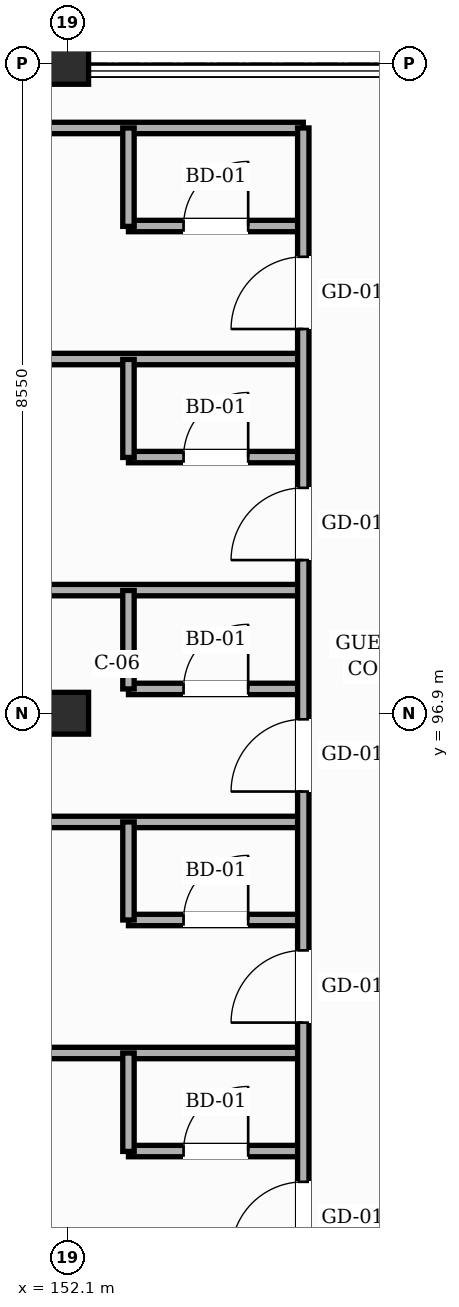
"""IFC4 building model, lengths in metres.
Left out: names, types, materials, properties, quantities, classifications, styles, units other than length and angle.
Written with IfcOpenShell. Run it as: python <this file> out.ifc"""

import sys

from ifc_helpers import new_model, si_unit, direction, frame, frame_2d, origin, origin_2d, place, context, subcontext, project, spatial, rectangle, hollow_rectangle, extrude, element, fill, save


model = new_model("IFC4")
c1 = context("Model", 3, precision=1e-05, world=origin(), true_north=direction((0.0, 1.0)))
c2 = subcontext(c1, "Body", "Model", "MODEL_VIEW")
j1 = project(units=[si_unit("LENGTHUNIT", "METRE"), si_unit("PLANEANGLEUNIT", "RADIAN")], contexts=[c1])
p1 = place(None, origin())
s1 = spatial("IfcSite", under=j1, at=p1, CompositionType="ELEMENT")
p2 = place(p1, origin())
s2 = spatial("IfcBuilding", under=s1, at=p2, CompositionType="ELEMENT")
p3 = place(p2, frame((0.0, 0.0, 24.6)))
s3 = spatial("IfcBuildingStorey", under=s2, at=p3, CompositionType="ELEMENT", Elevation=24.6)
for number, where, z_axis, x_axis in (
    (1, (152.1, 96.9, 0.0), (0.0, 0.0, 1.0), (1.0, 0.0, 0.0)),
    (2, (152.1, 105.45, 0.0), (0.0, 0.0, 1.0), (1.0, 0.0, 0.0)),
):
    element("IfcColumn", number, at=place(p3, frame(where, z_axis=z_axis, x_axis=x_axis)), inside=s3, PredefinedType="COLUMN", context=c2, shape_type="SweptSolid", body=[
        extrude(hollow_rectangle(XDim=0.55, YDim=0.55, WallThickness=0.022, InnerFilletRadius=0.022, OuterFilletRadius=0.044, at=origin_2d()), origin(), (0.0, 0.0, 1.0), 3.6),
    ])
p4 = place(p3, frame((152.9, 91.14, 0.0), z_axis=(0.0, 0.0, 1.0), x_axis=(1.0, 0.0, 0.0)))
e3 = element("IfcWall", 3, at=p4, inside=s3, PredefinedType="PARTITIONING", context=c2, shape_type="SweptSolid", body=[
    extrude(rectangle(XDim=2.3, YDim=0.15, at=frame_2d((1.15, 0.0))), origin(), (0.0, 0.0, 1.0), 3.365),
])
p5 = place(p4, frame((0.725, 0.0, 0.0)))
e4 = element("IfcOpeningElement", 4, at=p5, cuts=e3, PredefinedType="OPENING", context=c2, shape_type="SweptSolid", body=[
    extrude(rectangle(XDim=0.85, YDim=2.1, at=frame_2d((0.425, 1.05))), frame((0.0, 0.085, 0.0), z_axis=(0.0, -1.0, 0.0), x_axis=(1.0, 0.0, 0.0)), (0.0, 0.0, 1.0), 0.17),
])
p6 = place(p3, frame((144.2, 92.43, 0.0), z_axis=(0.0, 0.0, 1.0), x_axis=(1.0, 0.0, 0.0)))
e5 = element("IfcWall", 5, at=p6, inside=s3, PredefinedType="PARTITIONING", context=c2, shape_type="SweptSolid", body=[
    extrude(rectangle(XDim=11.0, YDim=0.15, at=frame_2d((5.5, 0.0))), origin(), (0.0, 0.0, 1.0), 3.365),
])
p7 = place(p3, frame((152.9, 94.18, 0.0), z_axis=(0.0, 0.0, 1.0), x_axis=(1.0, 0.0, 0.0)))
e6 = element("IfcWall", 6, at=p7, inside=s3, PredefinedType="PARTITIONING", context=c2, shape_type="SweptSolid", body=[
    extrude(rectangle(XDim=2.3, YDim=0.15, at=frame_2d((1.15, 0.0))), origin(), (0.0, 0.0, 1.0), 3.365),
])
p8 = place(p7, frame((0.725, 0.0, 0.0)))
e7 = element("IfcOpeningElement", 7, at=p8, cuts=e6, PredefinedType="OPENING", context=c2, shape_type="SweptSolid", body=[
    extrude(rectangle(XDim=0.85, YDim=2.1, at=frame_2d((0.425, 1.05))), frame((0.0, 0.085, 0.0), z_axis=(0.0, -1.0, 0.0), x_axis=(1.0, 0.0, 0.0)), (0.0, 0.0, 1.0), 0.17),
])
p9 = place(p3, frame((144.2, 95.47, 0.0), z_axis=(0.0, 0.0, 1.0), x_axis=(1.0, 0.0, 0.0)))
e8 = element("IfcWall", 8, at=p9, inside=s3, PredefinedType="PARTITIONING", context=c2, shape_type="SweptSolid", body=[
    extrude(rectangle(XDim=11.0, YDim=0.15, at=frame_2d((5.5, 0.0))), origin(), (0.0, 0.0, 1.0), 3.365),
])
p10 = place(p3, frame((152.9, 97.22, 0.0), z_axis=(0.0, 0.0, 1.0), x_axis=(1.0, 0.0, 0.0)))
e9 = element("IfcWall", 9, at=p10, inside=s3, PredefinedType="PARTITIONING", context=c2, shape_type="SweptSolid", body=[
    extrude(rectangle(XDim=2.3, YDim=0.15, at=frame_2d((1.15, 0.0))), origin(), (0.0, 0.0, 1.0), 2.805),
])
p11 = place(p10, frame((0.725, 0.0, 0.0)))
e10 = element("IfcOpeningElement", 10, at=p11, cuts=e9, PredefinedType="OPENING", context=c2, shape_type="SweptSolid", body=[
    extrude(rectangle(XDim=0.85, YDim=2.1, at=frame_2d((0.425, 1.05))), frame((0.0, 0.085, 0.0), z_axis=(0.0, -1.0, 0.0), x_axis=(1.0, 0.0, 0.0)), (0.0, 0.0, 1.0), 0.17),
])
p12 = place(p3, frame((144.2, 98.52, 0.0), z_axis=(0.0, 0.0, 1.0), x_axis=(1.0, 0.0, 0.0)))
e11 = element("IfcWall", 11, at=p12, inside=s3, PredefinedType="PARTITIONING", context=c2, shape_type="SweptSolid", body=[
    extrude(rectangle(XDim=11.0, YDim=0.15, at=frame_2d((5.5, 0.0))), origin(), (0.0, 0.0, 1.0), 3.365),
])
p13 = place(p3, frame((152.9, 100.27, 0.0), z_axis=(0.0, 0.0, 1.0), x_axis=(1.0, 0.0, 0.0)))
e12 = element("IfcWall", 12, at=p13, inside=s3, PredefinedType="PARTITIONING", context=c2, shape_type="SweptSolid", body=[
    extrude(rectangle(XDim=2.3, YDim=0.15, at=frame_2d((1.15, 0.0))), origin(), (0.0, 0.0, 1.0), 3.365),
])
p14 = place(p13, frame((0.725, 0.0, 0.0)))
e13 = element("IfcOpeningElement", 13, at=p14, cuts=e12, PredefinedType="OPENING", context=c2, shape_type="SweptSolid", body=[
    extrude(rectangle(XDim=0.85, YDim=2.1, at=frame_2d((0.425, 1.05))), frame((0.0, 0.085, 0.0), z_axis=(0.0, -1.0, 0.0), x_axis=(1.0, 0.0, 0.0)), (0.0, 0.0, 1.0), 0.17),
])
p15 = place(p3, frame((144.2, 101.56, 0.0), z_axis=(0.0, 0.0, 1.0), x_axis=(1.0, 0.0, 0.0)))
e14 = element("IfcWall", 14, at=p15, inside=s3, PredefinedType="PARTITIONING", context=c2, shape_type="SweptSolid", body=[
    extrude(rectangle(XDim=11.0, YDim=0.15, at=frame_2d((5.5, 0.0))), origin(), (0.0, 0.0, 1.0), 3.365),
])
p16 = place(p3, frame((152.9, 103.31, 0.0), z_axis=(0.0, 0.0, 1.0), x_axis=(1.0, 0.0, 0.0)))
e15 = element("IfcWall", 15, at=p16, inside=s3, PredefinedType="PARTITIONING", context=c2, shape_type="SweptSolid", body=[
    extrude(rectangle(XDim=2.3, YDim=0.15, at=frame_2d((1.15, 0.0))), origin(), (0.0, 0.0, 1.0), 3.365),
])
p17 = place(p16, frame((0.725, 0.0, 0.0)))
e16 = element("IfcOpeningElement", 16, at=p17, cuts=e15, PredefinedType="OPENING", context=c2, shape_type="SweptSolid", body=[
    extrude(rectangle(XDim=0.85, YDim=2.1, at=frame_2d((0.425, 1.05))), frame((0.0, 0.085, 0.0), z_axis=(0.0, -1.0, 0.0), x_axis=(1.0, 0.0, 0.0)), (0.0, 0.0, 1.0), 0.17),
])
p18 = place(p3, frame((144.2, 104.6, 0.0), z_axis=(0.0, 0.0, 1.0), x_axis=(1.0, 0.0, 0.0)))
e17 = element("IfcWall", 17, at=p18, inside=s3, PredefinedType="PARTITIONING", context=c2, shape_type="SweptSolid", body=[
    extrude(rectangle(XDim=11.0, YDim=0.15, at=frame_2d((5.5, 0.0))), origin(), (0.0, 0.0, 1.0), 3.365),
])
p19 = place(p3, frame((152.9, 91.135, 0.0), z_axis=(0.0, 0.0, 1.0), x_axis=(0.0, 1.0, 0.0)))
e18 = element("IfcWall", 18, at=p19, inside=s3, PredefinedType="PARTITIONING", context=c2, shape_type="SweptSolid", body=[
    extrude(rectangle(XDim=1.295, YDim=0.15, at=frame_2d((0.647, 0.0))), origin(), (0.0, 0.0, 1.0), 3.365),
])
p20 = place(p3, frame((152.9, 94.18, 0.0), z_axis=(0.0, 0.0, 1.0), x_axis=(0.0, 1.0, 0.0)))
e19 = element("IfcWall", 19, at=p20, inside=s3, PredefinedType="PARTITIONING", context=c2, shape_type="SweptSolid", body=[
    extrude(rectangle(XDim=1.29, YDim=0.15, at=frame_2d((0.645, 0.0))), origin(), (0.0, 0.0, 1.0), 3.365),
])
p21 = place(p3, frame((152.9, 97.22, 0.0), z_axis=(0.0, 0.0, 1.0), x_axis=(0.0, 1.0, 0.0)))
e20 = element("IfcWall", 20, at=p21, inside=s3, PredefinedType="PARTITIONING", context=c2, shape_type="SweptSolid", body=[
    extrude(rectangle(XDim=1.295, YDim=0.15, at=frame_2d((0.647, 0.0))), origin(), (0.0, 0.0, 1.0), 3.365),
])
p22 = place(p3, frame((152.9, 100.265, 0.0), z_axis=(0.0, 0.0, 1.0), x_axis=(0.0, 1.0, 0.0)))
e21 = element("IfcWall", 21, at=p22, inside=s3, PredefinedType="PARTITIONING", context=c2, shape_type="SweptSolid", body=[
    extrude(rectangle(XDim=1.29, YDim=0.15, at=frame_2d((0.645, 0.0))), origin(), (0.0, 0.0, 1.0), 3.365),
])
p23 = place(p3, frame((152.9, 103.305, 0.0), z_axis=(0.0, 0.0, 1.0), x_axis=(0.0, 1.0, 0.0)))
e22 = element("IfcWall", 22, at=p23, inside=s3, PredefinedType="PARTITIONING", context=c2, shape_type="SweptSolid", body=[
    extrude(rectangle(XDim=1.295, YDim=0.15, at=frame_2d((0.647, 0.0))), origin(), (0.0, 0.0, 1.0), 3.365),
])
p24 = place(p3, frame((155.2, 62.0, 0.0), z_axis=(0.0, 0.0, 1.0), x_axis=(0.0, 1.0, 0.0)))
e23 = element("IfcWall", 23, at=p24, inside=s3, PredefinedType="PARTITIONING", context=c2, shape_type="SweptSolid", body=[
    extrude(rectangle(XDim=42.6, YDim=0.15, at=frame_2d((21.3, 0.0))), origin(), (0.0, 0.0, 1.0), 3.365),
])
p25 = place(p24, frame((0.4, 0.0, 0.0)))
e24 = element("IfcOpeningElement", 24, at=p25, cuts=e23, PredefinedType="OPENING", context=c2, shape_type="SweptSolid", body=[
    extrude(rectangle(XDim=0.95, YDim=2.15, at=frame_2d((0.475, 1.075))), frame((0.0, 0.085, 0.0), z_axis=(0.0, -1.0, 0.0), x_axis=(1.0, 0.0, 0.0)), (0.0, 0.0, 1.0), 0.17),
])
p26 = place(p24, frame((3.445, 0.0, 0.0)))
e25 = element("IfcOpeningElement", 25, at=p26, cuts=e23, PredefinedType="OPENING", context=c2, shape_type="SweptSolid", body=[
    extrude(rectangle(XDim=0.95, YDim=2.15, at=frame_2d((0.475, 1.075))), frame((0.0, 0.085, 0.0), z_axis=(0.0, -1.0, 0.0), x_axis=(1.0, 0.0, 0.0)), (0.0, 0.0, 1.0), 0.17),
])
p27 = place(p24, frame((6.485, 0.0, 0.0)))
e26 = element("IfcOpeningElement", 26, at=p27, cuts=e23, PredefinedType="OPENING", context=c2, shape_type="SweptSolid", body=[
    extrude(rectangle(XDim=0.95, YDim=2.15, at=frame_2d((0.475, 1.075))), frame((0.0, 0.085, 0.0), z_axis=(0.0, -1.0, 0.0), x_axis=(1.0, 0.0, 0.0)), (0.0, 0.0, 1.0), 0.17),
])
p28 = place(p24, frame((9.53, 0.0, 0.0)))
e27 = element("IfcOpeningElement", 27, at=p28, cuts=e23, PredefinedType="OPENING", context=c2, shape_type="SweptSolid", body=[
    extrude(rectangle(XDim=0.95, YDim=2.15, at=frame_2d((0.475, 1.075))), frame((0.0, 0.085, 0.0), z_axis=(0.0, -1.0, 0.0), x_axis=(1.0, 0.0, 0.0)), (0.0, 0.0, 1.0), 0.17),
])
p29 = place(p24, frame((12.57, 0.0, 0.0)))
e28 = element("IfcOpeningElement", 28, at=p29, cuts=e23, PredefinedType="OPENING", context=c2, shape_type="SweptSolid", body=[
    extrude(rectangle(XDim=0.95, YDim=2.15, at=frame_2d((0.475, 1.075))), frame((0.0, 0.085, 0.0), z_axis=(0.0, -1.0, 0.0), x_axis=(1.0, 0.0, 0.0)), (0.0, 0.0, 1.0), 0.17),
])
p30 = place(p24, frame((15.615, 0.0, 0.0)))
e29 = element("IfcOpeningElement", 29, at=p30, cuts=e23, PredefinedType="OPENING", context=c2, shape_type="SweptSolid", body=[
    extrude(rectangle(XDim=0.95, YDim=2.15, at=frame_2d((0.475, 1.075))), frame((0.0, 0.085, 0.0), z_axis=(0.0, -1.0, 0.0), x_axis=(1.0, 0.0, 0.0)), (0.0, 0.0, 1.0), 0.17),
])
p31 = place(p24, frame((18.655, 0.0, 0.0)))
e30 = element("IfcOpeningElement", 30, at=p31, cuts=e23, PredefinedType="OPENING", context=c2, shape_type="SweptSolid", body=[
    extrude(rectangle(XDim=0.95, YDim=2.15, at=frame_2d((0.475, 1.075))), frame((0.0, 0.085, 0.0), z_axis=(0.0, -1.0, 0.0), x_axis=(1.0, 0.0, 0.0)), (0.0, 0.0, 1.0), 0.17),
])
p32 = place(p24, frame((21.7, 0.0, 0.0)))
e31 = element("IfcOpeningElement", 31, at=p32, cuts=e23, PredefinedType="OPENING", context=c2, shape_type="SweptSolid", body=[
    extrude(rectangle(XDim=0.95, YDim=2.15, at=frame_2d((0.475, 1.075))), frame((0.0, 0.085, 0.0), z_axis=(0.0, -1.0, 0.0), x_axis=(1.0, 0.0, 0.0)), (0.0, 0.0, 1.0), 0.17),
])
p33 = place(p24, frame((24.745, 0.0, 0.0)))
e32 = element("IfcOpeningElement", 32, at=p33, cuts=e23, PredefinedType="OPENING", context=c2, shape_type="SweptSolid", body=[
    extrude(rectangle(XDim=0.95, YDim=2.15, at=frame_2d((0.475, 1.075))), frame((0.0, 0.085, 0.0), z_axis=(0.0, -1.0, 0.0), x_axis=(1.0, 0.0, 0.0)), (0.0, 0.0, 1.0), 0.17),
])
p34 = place(p24, frame((27.785, 0.0, 0.0)))
e33 = element("IfcOpeningElement", 33, at=p34, cuts=e23, PredefinedType="OPENING", context=c2, shape_type="SweptSolid", body=[
    extrude(rectangle(XDim=0.95, YDim=2.15, at=frame_2d((0.475, 1.075))), frame((0.0, 0.085, 0.0), z_axis=(0.0, -1.0, 0.0), x_axis=(1.0, 0.0, 0.0)), (0.0, 0.0, 1.0), 0.17),
])
p35 = place(p24, frame((30.83, 0.0, 0.0)))
e34 = element("IfcOpeningElement", 34, at=p35, cuts=e23, PredefinedType="OPENING", context=c2, shape_type="SweptSolid", body=[
    extrude(rectangle(XDim=0.95, YDim=2.15, at=frame_2d((0.475, 1.075))), frame((0.0, 0.085, 0.0), z_axis=(0.0, -1.0, 0.0), x_axis=(1.0, 0.0, 0.0)), (0.0, 0.0, 1.0), 0.17),
])
p36 = place(p24, frame((33.87, 0.0, 0.0)))
e35 = element("IfcOpeningElement", 35, at=p36, cuts=e23, PredefinedType="OPENING", context=c2, shape_type="SweptSolid", body=[
    extrude(rectangle(XDim=0.95, YDim=2.15, at=frame_2d((0.475, 1.075))), frame((0.0, 0.085, 0.0), z_axis=(0.0, -1.0, 0.0), x_axis=(1.0, 0.0, 0.0)), (0.0, 0.0, 1.0), 0.17),
])
p37 = place(p24, frame((36.915, 0.0, 0.0)))
e36 = element("IfcOpeningElement", 36, at=p37, cuts=e23, PredefinedType="OPENING", context=c2, shape_type="SweptSolid", body=[
    extrude(rectangle(XDim=0.95, YDim=2.15, at=frame_2d((0.475, 1.075))), frame((0.0, 0.085, 0.0), z_axis=(0.0, -1.0, 0.0), x_axis=(1.0, 0.0, 0.0)), (0.0, 0.0, 1.0), 0.17),
])
p38 = place(p24, frame((39.955, 0.0, 0.0)))
e37 = element("IfcOpeningElement", 37, at=p38, cuts=e23, PredefinedType="OPENING", context=c2, shape_type="SweptSolid", body=[
    extrude(rectangle(XDim=0.95, YDim=2.15, at=frame_2d((0.475, 1.075))), frame((0.0, 0.085, 0.0), z_axis=(0.0, -1.0, 0.0), x_axis=(1.0, 0.0, 0.0)), (0.0, 0.0, 1.0), 0.17),
])
p39 = place(p34, origin())
e38 = element("IfcDoor", 38, at=p39, inside=s3, OperationType="SINGLE_SWING_LEFT", PredefinedType="DOOR", context=c2, shape_type="SweptSolid", body=[
    extrude(rectangle(XDim=0.95, YDim=2.15, at=frame_2d((0.475, 1.075))), frame((0.0, 0.025, 0.0), z_axis=(0.0, -1.0, 0.0), x_axis=(1.0, 0.0, 0.0)), (0.0, 0.0, 1.0), 0.05),
])
fill(e33, e38)
p40 = place(p5, origin())
e39 = element("IfcDoor", 39, at=p40, inside=s3, OperationType="SINGLE_SWING_RIGHT", PredefinedType="DOOR", context=c2, shape_type="SweptSolid", body=[
    extrude(rectangle(XDim=0.85, YDim=2.1, at=frame_2d((0.425, 1.05))), frame((0.0, 0.025, 0.0), z_axis=(0.0, -1.0, 0.0), x_axis=(1.0, 0.0, 0.0)), (0.0, 0.0, 1.0), 0.05),
])
fill(e4, e39)
p41 = place(p35, origin())
e40 = element("IfcDoor", 40, at=p41, inside=s3, OperationType="SINGLE_SWING_LEFT", PredefinedType="DOOR", context=c2, shape_type="SweptSolid", body=[
    extrude(rectangle(XDim=0.95, YDim=2.15, at=frame_2d((0.475, 1.075))), frame((0.0, 0.025, 0.0), z_axis=(0.0, -1.0, 0.0), x_axis=(1.0, 0.0, 0.0)), (0.0, 0.0, 1.0), 0.05),
])
fill(e34, e40)
p42 = place(p8, origin())
e41 = element("IfcDoor", 41, at=p42, inside=s3, OperationType="SINGLE_SWING_RIGHT", PredefinedType="DOOR", context=c2, shape_type="SweptSolid", body=[
    extrude(rectangle(XDim=0.85, YDim=2.1, at=frame_2d((0.425, 1.05))), frame((0.0, 0.025, 0.0), z_axis=(0.0, -1.0, 0.0), x_axis=(1.0, 0.0, 0.0)), (0.0, 0.0, 1.0), 0.05),
])
fill(e7, e41)
p43 = place(p36, origin())
e42 = element("IfcDoor", 42, at=p43, inside=s3, OperationType="SINGLE_SWING_LEFT", PredefinedType="DOOR", context=c2, shape_type="SweptSolid", body=[
    extrude(rectangle(XDim=0.95, YDim=2.15, at=frame_2d((0.475, 1.075))), frame((0.0, 0.025, 0.0), z_axis=(0.0, -1.0, 0.0), x_axis=(1.0, 0.0, 0.0)), (0.0, 0.0, 1.0), 0.05),
])
fill(e35, e42)
p44 = place(p11, origin())
e43 = element("IfcDoor", 43, at=p44, inside=s3, OperationType="SINGLE_SWING_RIGHT", PredefinedType="DOOR", context=c2, shape_type="SweptSolid", body=[
    extrude(rectangle(XDim=0.85, YDim=2.1, at=frame_2d((0.425, 1.05))), frame((0.0, 0.025, 0.0), z_axis=(0.0, -1.0, 0.0), x_axis=(1.0, 0.0, 0.0)), (0.0, 0.0, 1.0), 0.05),
])
fill(e10, e43)
p45 = place(p37, origin())
e44 = element("IfcDoor", 44, at=p45, inside=s3, OperationType="SINGLE_SWING_LEFT", PredefinedType="DOOR", context=c2, shape_type="SweptSolid", body=[
    extrude(rectangle(XDim=0.95, YDim=2.15, at=frame_2d((0.475, 1.075))), frame((0.0, 0.025, 0.0), z_axis=(0.0, -1.0, 0.0), x_axis=(1.0, 0.0, 0.0)), (0.0, 0.0, 1.0), 0.05),
])
fill(e36, e44)
p46 = place(p14, origin())
e45 = element("IfcDoor", 45, at=p46, inside=s3, OperationType="SINGLE_SWING_RIGHT", PredefinedType="DOOR", context=c2, shape_type="SweptSolid", body=[
    extrude(rectangle(XDim=0.85, YDim=2.1, at=frame_2d((0.425, 1.05))), frame((0.0, 0.025, 0.0), z_axis=(0.0, -1.0, 0.0), x_axis=(1.0, 0.0, 0.0)), (0.0, 0.0, 1.0), 0.05),
])
fill(e13, e45)
p47 = place(p38, origin())
e46 = element("IfcDoor", 46, at=p47, inside=s3, OperationType="SINGLE_SWING_LEFT", PredefinedType="DOOR", context=c2, shape_type="SweptSolid", body=[
    extrude(rectangle(XDim=0.95, YDim=2.15, at=frame_2d((0.475, 1.075))), frame((0.0, 0.025, 0.0), z_axis=(0.0, -1.0, 0.0), x_axis=(1.0, 0.0, 0.0)), (0.0, 0.0, 1.0), 0.05),
])
fill(e37, e46)
p48 = place(p17, origin())
e47 = element("IfcDoor", 47, at=p48, inside=s3, OperationType="SINGLE_SWING_RIGHT", PredefinedType="DOOR", context=c2, shape_type="SweptSolid", body=[
    extrude(rectangle(XDim=0.85, YDim=2.1, at=frame_2d((0.425, 1.05))), frame((0.0, 0.025, 0.0), z_axis=(0.0, -1.0, 0.0), x_axis=(1.0, 0.0, 0.0)), (0.0, 0.0, 1.0), 0.05),
])
fill(e16, e47)
save(model, sys.argv[1])
